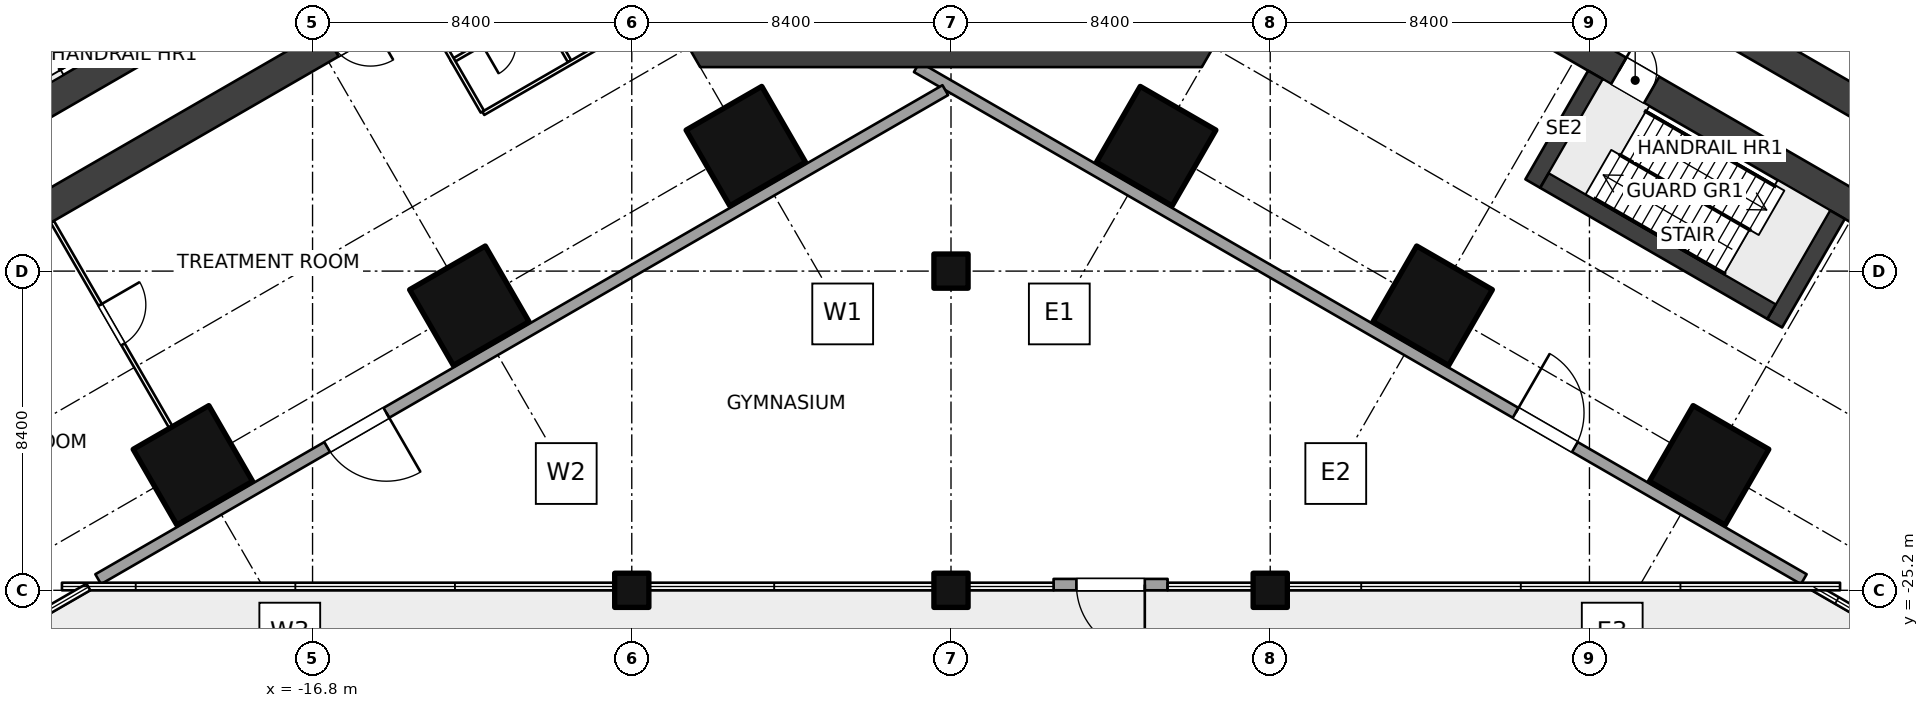
"""IFC4 building model, lengths in metres.
Left out: names, types, materials, properties, quantities, classifications, styles, units other than length and angle.
Written with IfcOpenShell. Run it as: python <this file> out.ifc"""

import sys

from ifc_helpers import new_model, si_unit, direction, frame, frame_2d, origin, origin_2d, place, context, subcontext, project, spatial, polyline, rectangle, outline, extrude, element, fill, save


model = new_model("IFC4")
c1 = context("Model", 3, precision=1e-05, world=origin(), true_north=direction((0.0, 1.0)))
c2 = subcontext(c1, "Body", "Model", "MODEL_VIEW")
j1 = project(units=[si_unit("LENGTHUNIT", "METRE"), si_unit("PLANEANGLEUNIT", "RADIAN")], contexts=[c1])
p1 = place(None, origin())
s1 = spatial("IfcSite", under=j1, at=p1, CompositionType="ELEMENT")
p2 = place(p1, origin())
s2 = spatial("IfcBuilding", under=s1, at=p2, CompositionType="ELEMENT")
p3 = place(p2, frame((0.0, 0.0, 11.0)))
s3 = spatial("IfcBuildingStorey", under=s2, at=p3, CompositionType="ELEMENT", Elevation=11.0)
for number, where, z_axis, x_axis in (
    (1, (-5.4, -13.51, 0.0), (0.0, 0.0, 1.0), (-0.5, 0.866, 0.0)),
    (2, (-12.675, -17.71, 0.0), (0.0, 0.0, 1.0), (-0.5, 0.866, 0.0)),
    (3, (-19.949, -21.91, 0.0), (0.0, 0.0, 1.0), (-0.5, 0.866, 0.0)),
    (4, (5.4, -13.51, 0.0), (0.0, 0.0, 1.0), (-0.5, -0.866, 0.0)),
    (5, (12.675, -17.71, 0.0), (0.0, 0.0, 1.0), (-0.5, -0.866, 0.0)),
    (6, (19.949, -21.91, 0.0), (0.0, 0.0, 1.0), (-0.5, -0.866, 0.0)),
):
    element("IfcColumn", number, at=place(p3, frame(where, z_axis=z_axis, x_axis=x_axis)), inside=s3, PredefinedType="COLUMN", context=c2, shape_type="SweptSolid", body=[
        extrude(rectangle(XDim=2.3, YDim=2.3, at=origin_2d()), origin(), (0.0, 0.0, 1.0), 5.0),
    ])
for number, where, z_axis, x_axis in (
    (7, (-8.4, -25.2, 0.0), (0.0, 0.0, 1.0), (1.0, 0.0, 0.0)),
    (8, (0.0, -25.2, 0.0), (0.0, 0.0, 1.0), (1.0, 0.0, 0.0)),
    (9, (0.0, -16.8, 0.0), (0.0, 0.0, 1.0), (1.0, 0.0, 0.0)),
    (10, (8.4, -25.2, 0.0), (0.0, 0.0, 1.0), (1.0, 0.0, 0.0)),
):
    element("IfcColumn", number, at=place(p3, frame(where, z_axis=z_axis, x_axis=x_axis)), inside=s3, PredefinedType="COLUMN", context=c2, shape_type="SweptSolid", body=[
        extrude(rectangle(XDim=0.9, YDim=0.9, at=origin_2d()), origin(), (0.0, 0.0, 1.0), 5.0),
    ])
p4 = place(p3, origin())
e11 = element("IfcWall", 11, at=p4, inside=s3, PredefinedType="SHEAR", context=c2, shape_type="SweptSolid", body=[
    extrude(outline(polyline([(-6.6, -11.432), (6.6, -11.432), (6.86, -10.981), (6.08, -10.531), (-6.08, -10.531), (-6.86, -10.981), (-6.6, -11.432)])), origin(), (0.0, 0.0, 1.0), 5.0),
])
p5 = place(p3, frame((-8.91, -6.53, 0.0), z_axis=(0.0, 0.0, 1.0), x_axis=(-0.866024404313, -0.500001731131, 0.0)))
e12 = element("IfcWall", 12, at=p5, inside=s3, PredefinedType="SHEAR", context=c2, shape_type="SweptSolid", body=[
    extrude(rectangle(XDim=36.953, YDim=0.8, at=frame_2d((18.477, 0.0))), origin(), (0.0, 0.0, 1.0), 5.0),
])
p6 = place(p5, frame((2.75, 0.0, 0.0)))
e13 = element("IfcOpeningElement", 13, at=p6, cuts=e12, PredefinedType="OPENING", context=c2, shape_type="SweptSolid", body=[
    extrude(rectangle(XDim=1.2, YDim=2.1, at=frame_2d((0.6, 1.05))), frame((0.0, 0.41, 0.0), z_axis=(0.0, -1.0, 0.0), x_axis=(1.0, 0.0, 0.0)), (0.0, 0.0, 1.0), 0.82),
])
p7 = place(p5, frame((7.35, 0.0, 0.0)))
e14 = element("IfcOpeningElement", 14, at=p7, cuts=e12, PredefinedType="OPENING", context=c2, shape_type="SweptSolid", body=[
    extrude(rectangle(XDim=1.2, YDim=2.1, at=frame_2d((0.6, 1.05))), frame((0.0, 0.41, 0.0), z_axis=(0.0, -1.0, 0.0), x_axis=(1.0, 0.0, 0.0)), (0.0, 0.0, 1.0), 0.82),
])
p8 = place(p3, frame((-10.11, -4.451, 0.0), z_axis=(0.0, 0.0, 1.0), x_axis=(-0.866025284237, -0.500000207062, 0.0)))
e15 = element("IfcWall", 15, at=p8, inside=s3, PredefinedType="SHEAR", context=c2, shape_type="SweptSolid", body=[
    extrude(rectangle(XDim=36.75, YDim=0.8, at=frame_2d((18.375, 0.0))), origin(), (0.0, 0.0, 1.0), 5.0),
])
p9 = place(p8, frame((10.0, 0.0, 0.0)))
e16 = element("IfcOpeningElement", 16, at=p9, cuts=e15, PredefinedType="OPENING", context=c2, shape_type="SweptSolid", body=[
    extrude(rectangle(XDim=1.0, YDim=2.1, at=frame_2d((0.5, 1.05))), frame((0.0, 0.41, 0.0), z_axis=(0.0, -1.0, 0.0), x_axis=(1.0, 0.0, 0.0)), (0.0, 0.0, 1.0), 0.82),
])
p10 = place(p8, frame((2.85, 0.0, 0.0)))
e17 = element("IfcOpeningElement", 17, at=p10, cuts=e15, PredefinedType="OPENING", context=c2, shape_type="SweptSolid", body=[
    extrude(rectangle(XDim=1.2, YDim=2.1, at=frame_2d((0.6, 1.05))), frame((0.0, 0.41, 0.0), z_axis=(0.0, -1.0, 0.0), x_axis=(1.0, 0.0, 0.0)), (0.0, 0.0, 1.0), 0.82),
])
p11 = place(p3, frame((10.11, -4.451, 0.0), z_axis=(0.0, 0.0, 1.0), x_axis=(0.866025284237, -0.500000207062, 0.0)))
e18 = element("IfcWall", 18, at=p11, inside=s3, PredefinedType="SHEAR", context=c2, shape_type="SweptSolid", body=[
    extrude(rectangle(XDim=36.75, YDim=0.8, at=frame_2d((18.375, 0.0))), origin(), (0.0, 0.0, 1.0), 5.0),
])
p12 = place(p11, frame((1.35, 0.0, 0.0)))
e19 = element("IfcOpeningElement", 19, at=p12, cuts=e18, PredefinedType="OPENING", context=c2, shape_type="SweptSolid", body=[
    extrude(rectangle(XDim=1.2, YDim=2.1, at=frame_2d((0.6, 1.05))), frame((0.0, 0.41, 0.0), z_axis=(0.0, -1.0, 0.0), x_axis=(1.0, 0.0, 0.0)), (0.0, 0.0, 1.0), 0.82),
])
p13 = place(p3, frame((8.91, -6.53, 0.0), z_axis=(0.0, 0.0, 1.0), x_axis=(0.866024404313, -0.500001731131, 0.0)))
e20 = element("IfcWall", 20, at=p13, inside=s3, PredefinedType="SHEAR", context=c2, shape_type="SweptSolid", body=[
    extrude(rectangle(XDim=36.953, YDim=0.8, at=frame_2d((18.477, 0.0))), origin(), (0.0, 0.0, 1.0), 5.0),
])
p14 = place(p13, frame((10.0, 0.0, 0.0)))
e21 = element("IfcOpeningElement", 21, at=p14, cuts=e20, PredefinedType="OPENING", context=c2, shape_type="SweptSolid", body=[
    extrude(rectangle(XDim=1.0, YDim=2.1, at=frame_2d((0.5, 1.05))), frame((0.0, 0.41, 0.0), z_axis=(0.0, -1.0, 0.0), x_axis=(1.0, 0.0, 0.0)), (0.0, 0.0, 1.0), 0.82),
])
p15 = place(p13, frame((2.85, 0.0, 0.0)))
e22 = element("IfcOpeningElement", 22, at=p15, cuts=e20, PredefinedType="OPENING", context=c2, shape_type="SweptSolid", body=[
    extrude(rectangle(XDim=1.2, YDim=2.1, at=frame_2d((0.6, 1.05))), frame((0.0, 0.41, 0.0), z_axis=(0.0, -1.0, 0.0), x_axis=(1.0, 0.0, 0.0)), (0.0, 0.0, 1.0), 0.82),
])
p16 = place(p3, frame((5.7, -25.05, 0.0), z_axis=(0.0, 0.0, 1.0), x_axis=(-1.0, 0.0, 0.0)))
e23 = element("IfcWall", 23, at=p16, inside=s3, PredefinedType="SOLIDWALL", context=c2, shape_type="SweptSolid", body=[
    extrude(rectangle(XDim=3.0, YDim=0.3, at=frame_2d((1.5, 0.0))), origin(), (0.0, 0.0, 1.0), 3.7),
])
p17 = place(p16, frame((0.6, 0.0, 0.0)))
e24 = element("IfcOpeningElement", 24, at=p17, cuts=e23, PredefinedType="OPENING", context=c2, shape_type="SweptSolid", body=[
    extrude(rectangle(XDim=1.8, YDim=2.4, at=frame_2d((0.9, 1.2))), frame((0.0, 0.16, 0.0), z_axis=(0.0, -1.0, 0.0), x_axis=(1.0, 0.0, 0.0)), (0.0, 0.0, 1.0), 0.32),
])
p18 = place(p3, frame((-8.3, -8.487, 0.0), z_axis=(0.0, 0.0, 1.0), x_axis=(-0.866015695474, -0.500016814911, 0.0)))
e25 = element("IfcWall", 25, at=p18, inside=s3, PredefinedType="PARTITIONING", context=c2, shape_type="SweptSolid", body=[
    extrude(rectangle(XDim=5.6, YDim=0.1, at=frame_2d((2.8, 0.0))), origin(), (0.0, 0.0, 1.0), 4.7),
])
p19 = place(p18, frame((1.125, 0.0, 0.0)))
e26 = element("IfcOpeningElement", 26, at=p19, cuts=e25, PredefinedType="OPENING", context=c2, shape_type="SweptSolid", body=[
    extrude(rectangle(XDim=0.9, YDim=2.1, at=frame_2d((0.45, 1.05))), frame((0.0, 0.06, 0.0), z_axis=(0.0, -1.0, 0.0), x_axis=(1.0, 0.0, 0.0)), (0.0, 0.0, 1.0), 0.12),
])
p20 = place(p18, frame((3.775, 0.0, 0.0)))
e27 = element("IfcOpeningElement", 27, at=p20, cuts=e25, PredefinedType="OPENING", context=c2, shape_type="SweptSolid", body=[
    extrude(rectangle(XDim=0.9, YDim=2.1, at=frame_2d((0.45, 1.05))), frame((0.0, 0.06, 0.0), z_axis=(0.0, -1.0, 0.0), x_axis=(1.0, 0.0, 0.0)), (0.0, 0.0, 1.0), 0.12),
])
p21 = place(p3, frame((-10.786, -9.98, 0.0), z_axis=(0.0, 0.0, 1.0), x_axis=(0.500060622324, -0.86599040064, 0.0)))
e28 = element("IfcWall", 28, at=p21, inside=s3, PredefinedType="PARTITIONING", context=c2, shape_type="SweptSolid", body=[
    extrude(rectangle(XDim=1.5, YDim=0.1, at=frame_2d((0.75, 0.0))), origin(), (0.0, 0.0, 1.0), 4.7),
])
p22 = place(p3, frame((-7.5, -9.873, 0.0), z_axis=(0.0, 0.0, 1.0), x_axis=(-0.866031018186, -0.499990275446, 0.0)))
e29 = element("IfcWall", 29, at=p22, inside=s3, PredefinedType="PARTITIONING", context=c2, shape_type="SweptSolid", body=[
    extrude(rectangle(XDim=5.55, YDim=0.1, at=frame_2d((2.775, 0.0))), origin(), (0.0, 0.0, 1.0), 4.7),
])
p23 = place(p3, frame((-13.906, -9.876, 0.0), z_axis=(0.0, 0.0, 1.0), x_axis=(0.499981869177, -0.866035871367, 0.0)))
e30 = element("IfcWall", 30, at=p23, inside=s3, PredefinedType="PARTITIONING", context=c2, shape_type="SweptSolid", body=[
    extrude(rectangle(XDim=3.15, YDim=0.1, at=frame_2d((1.575, 0.0))), origin(), (0.0, 0.0, 1.0), 4.7),
])
p24 = place(p3, frame((-23.649, -15.501, 0.0), z_axis=(0.0, 0.0, 1.0), x_axis=(0.500004234368, -0.866022959057, 0.0)))
e31 = element("IfcWall", 31, at=p24, inside=s3, PredefinedType="PARTITIONING", context=c2, shape_type="SweptSolid", body=[
    extrude(rectangle(XDim=6.25, YDim=0.1, at=frame_2d((3.125, 0.0))), origin(), (0.0, 0.0, 1.0), 2.9),
])
p25 = place(p24, frame((2.525, 0.0, 0.0)))
e32 = element("IfcOpeningElement", 32, at=p25, cuts=e31, PredefinedType="OPENING", context=c2, shape_type="SweptSolid", body=[
    extrude(rectangle(XDim=1.2, YDim=2.1, at=frame_2d((0.6, 1.05))), frame((0.0, 0.06, 0.0), z_axis=(0.0, -1.0, 0.0), x_axis=(1.0, 0.0, 0.0)), (0.0, 0.0, 1.0), 0.12),
])
p26 = place(p3, frame((-0.15, -12.038, 0.0), z_axis=(0.0, 0.0, 1.0), x_axis=(-0.866030473254, -0.499991219318, 0.0)))
e33 = element("IfcWall", 33, at=p26, inside=s3, PredefinedType="SOLIDWALL", context=c2, shape_type="SweptSolid", body=[
    extrude(rectangle(XDim=25.739, YDim=0.3, at=frame_2d((12.869, 0.0))), origin(), (0.0, 0.0, 1.0), 4.7),
])
p27 = place(p26, frame((16.983, 0.0, 0.0)))
e34 = element("IfcOpeningElement", 34, at=p27, cuts=e33, PredefinedType="OPENING", context=c2, shape_type="SweptSolid", body=[
    extrude(rectangle(XDim=1.8, YDim=2.4, at=frame_2d((0.9, 1.2))), frame((0.0, 0.16, 0.0), z_axis=(0.0, -1.0, 0.0), x_axis=(1.0, 0.0, 0.0)), (0.0, 0.0, 1.0), 0.32),
])
p28 = place(p3, frame((-9.45, 6.495, 0.0), z_axis=(0.0, 0.0, 1.0), x_axis=(-0.866025301493, -0.500000177174, 0.0)))
e35 = element("IfcWall", 35, at=p28, inside=s3, PredefinedType="SOLIDWALL", context=c2, shape_type="SweptSolid", body=[
    extrude(rectangle(XDim=43.095, YDim=0.3, at=frame_2d((21.548, 0.0))), origin(), (0.0, 0.0, 1.0), 4.7),
])
p29 = place(p28, frame((26.595, 0.0, 0.0)))
e36 = element("IfcOpeningElement", 36, at=p29, cuts=e35, PredefinedType="OPENING", context=c2, shape_type="SweptSolid", body=[
    extrude(rectangle(XDim=1.8, YDim=2.4, at=frame_2d((0.9, 1.2))), frame((0.0, 0.16, 0.0), z_axis=(0.0, -1.0, 0.0), x_axis=(1.0, 0.0, 0.0)), (0.0, 0.0, 1.0), 0.32),
])
p30 = place(p3, frame((9.45, 6.495, 0.0), z_axis=(0.0, 0.0, 1.0), x_axis=(0.866025301493, -0.500000177174, 0.0)))
e37 = element("IfcWall", 37, at=p30, inside=s3, PredefinedType="SOLIDWALL", context=c2, shape_type="SweptSolid", body=[
    extrude(rectangle(XDim=43.095, YDim=0.3, at=frame_2d((21.548, 0.0))), origin(), (0.0, 0.0, 1.0), 4.7),
])
p31 = place(p30, frame((26.595, 0.0, 0.0)))
e38 = element("IfcOpeningElement", 38, at=p31, cuts=e37, PredefinedType="OPENING", context=c2, shape_type="SweptSolid", body=[
    extrude(rectangle(XDim=1.8, YDim=2.4, at=frame_2d((0.9, 1.2))), frame((0.0, 0.16, 0.0), z_axis=(0.0, -1.0, 0.0), x_axis=(1.0, 0.0, 0.0)), (0.0, 0.0, 1.0), 0.32),
])
p32 = place(p3, frame((-0.9, -11.432, 0.0), z_axis=(0.0, 0.0, 1.0), x_axis=(0.866028700395, -0.49999429006, 0.0)))
e39 = element("IfcWall", 39, at=p32, inside=s3, PredefinedType="SOLIDWALL", context=c2, shape_type="SweptSolid", body=[
    extrude(rectangle(XDim=26.951, YDim=0.3, at=frame_2d((13.476, 0.0))), origin(), (0.0, 0.0, 1.0), 4.7),
])
p33 = place(p32, frame((18.195, 0.0, 0.0)))
e40 = element("IfcOpeningElement", 40, at=p33, cuts=e39, PredefinedType="OPENING", context=c2, shape_type="SweptSolid", body=[
    extrude(rectangle(XDim=1.8, YDim=2.4, at=frame_2d((0.9, 1.2))), frame((0.0, 0.16, 0.0), z_axis=(0.0, -1.0, 0.0), x_axis=(1.0, 0.0, 0.0)), (0.0, 0.0, 1.0), 0.32),
])
for number, where, z_axis, x_axis in (
    (41, (16.959, -11.639, 0.0), (0.0, 0.0, 1.0), (-0.5, -0.866, 0.0)),
    (42, (23.324, -15.314, 0.0), (0.0, 0.0, 1.0), (-0.5, -0.866, 0.0)),
):
    element("IfcWall", number, at=place(p3, frame(where, z_axis=z_axis, x_axis=x_axis)), inside=s3, PredefinedType="SOLIDWALL", context=c2, shape_type="SweptSolid", body=[
        extrude(rectangle(XDim=3.3, YDim=0.45, at=frame_2d((1.65, 0.0))), origin(), (0.0, 0.0, 1.0), 5.0),
    ])
p34 = place(p3, frame((15.616, -14.415, 0.0), z_axis=(0.0, 0.0, 1.0), x_axis=(0.866028853923, -0.499994024137, 0.0)))
e43 = element("IfcWall", 43, at=p34, inside=s3, PredefinedType="SOLIDWALL", context=c2, shape_type="SweptSolid", body=[
    extrude(rectangle(XDim=6.9, YDim=0.45, at=frame_2d((3.45, 0.0))), origin(), (0.0, 0.0, 1.0), 5.0),
])
p35 = place(p17, origin())
e44 = element("IfcDoor", 44, at=p35, inside=s3, OperationType="DOUBLE_DOOR_SINGLE_SWING", PredefinedType="DOOR", context=c2, shape_type="SweptSolid", body=[
    extrude(rectangle(XDim=1.8, YDim=2.4, at=frame_2d((0.9, 1.2))), frame((0.0, 0.025, 0.0), z_axis=(0.0, -1.0, 0.0), x_axis=(1.0, 0.0, 0.0)), (0.0, 0.0, 1.0), 0.05),
])
fill(e24, e44)
p36 = place(p25, origin())
e45 = element("IfcDoor", 45, at=p36, inside=s3, OperationType="DOUBLE_SWING_LEFT", PredefinedType="DOOR", context=c2, shape_type="SweptSolid", body=[
    extrude(rectangle(XDim=1.2, YDim=2.1, at=frame_2d((0.6, 1.05))), frame((0.0, 0.025, 0.0), z_axis=(0.0, -1.0, 0.0), x_axis=(1.0, 0.0, 0.0)), (0.0, 0.0, 1.0), 0.05),
])
fill(e32, e45)
p37 = place(p14, origin())
e46 = element("IfcDoor", 46, at=p37, inside=s3, OperationType="SINGLE_SWING_LEFT", PredefinedType="DOOR", context=c2, shape_type="SweptSolid", body=[
    extrude(rectangle(XDim=1.0, YDim=2.1, at=frame_2d((0.5, 1.05))), frame((0.0, 0.025, 0.0), z_axis=(0.0, -1.0, 0.0), x_axis=(1.0, 0.0, 0.0)), (0.0, 0.0, 1.0), 0.05),
])
fill(e21, e46)
p38 = place(p27, origin())
e47 = element("IfcDoor", 47, at=p38, inside=s3, OperationType="DOUBLE_DOOR_DOUBLE_SWING", PredefinedType="DOOR", context=c2, shape_type="SweptSolid", body=[
    extrude(rectangle(XDim=1.8, YDim=2.4, at=frame_2d((0.9, 1.2))), frame((0.0, 0.025, 0.0), z_axis=(0.0, -1.0, 0.0), x_axis=(1.0, 0.0, 0.0)), (0.0, 0.0, 1.0), 0.05),
])
fill(e34, e47)
p39 = place(p33, origin())
e48 = element("IfcDoor", 48, at=p39, inside=s3, OperationType="DOUBLE_DOOR_DOUBLE_SWING", PredefinedType="DOOR", context=c2, shape_type="SweptSolid", body=[
    extrude(rectangle(XDim=1.8, YDim=2.4, at=frame_2d((0.9, 1.2))), frame((0.0, 0.025, 0.0), z_axis=(0.0, -1.0, 0.0), x_axis=(1.0, 0.0, 0.0)), (0.0, 0.0, 1.0), 0.05),
])
fill(e40, e48)
save(model, sys.argv[1])
